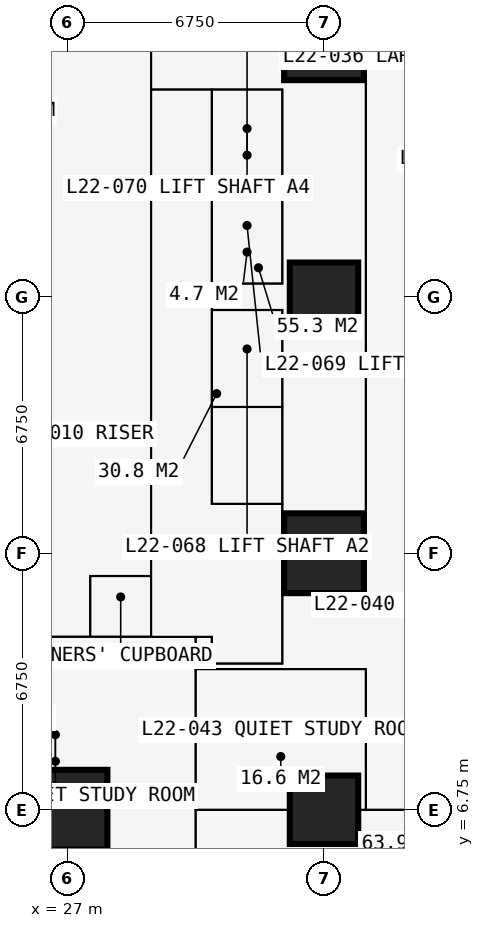
"""IFC4 building model, lengths in metres.
Left out: names, types, materials, properties, quantities, classifications, styles, units other than length and angle.
Written with IfcOpenShell. Run it as: python <this file> out.ifc"""

import sys

from ifc_helpers import new_model, si_unit, direction, frame, frame_2d, origin, origin_2d, place, context, subcontext, project, spatial, rectangle, extrude, element, fill, save


model = new_model("IFC4")
c1 = context("Model", 3, precision=1e-05, world=origin(), true_north=direction((0.0, 1.0)))
c2 = subcontext(c1, "Body", "Model", "MODEL_VIEW")
j1 = project(units=[si_unit("LENGTHUNIT", "METRE"), si_unit("PLANEANGLEUNIT", "RADIAN")], contexts=[c1])
p1 = place(None, origin())
s1 = spatial("IfcSite", under=j1, at=p1, CompositionType="ELEMENT")
p2 = place(p1, origin())
s2 = spatial("IfcBuilding", under=s1, at=p2, CompositionType="ELEMENT")
p3 = place(p2, frame((0.0, 0.0, 83.7)))
s3 = spatial("IfcBuildingStorey", under=s2, at=p3, CompositionType="ELEMENT", Elevation=83.7)
p4 = place(p3, frame((27.0, 6.75, 0.0), z_axis=(0.0, 0.0, 1.0), x_axis=(1.0, 0.0, 0.0)))
e1 = element("IfcColumn", 1, at=p4, inside=s3, PredefinedType="COLUMN", context=c2, shape_type="SweptSolid", body=[
    extrude(rectangle(XDim=2.1, YDim=2.1, at=origin_2d()), origin(), (0.0, 0.0, 1.0), 3.6),
])
p5 = place(p3, frame((33.75, 6.75, 0.0), z_axis=(0.0, 0.0, 1.0), x_axis=(1.0, 0.0, 0.0)))
e2 = element("IfcColumn", 2, at=p5, inside=s3, PredefinedType="COLUMN", context=c2, shape_type="SweptSolid", body=[
    extrude(rectangle(XDim=1.8, YDim=1.8, at=origin_2d()), origin(), (0.0, 0.0, 1.0), 3.6),
])
p6 = place(p3, frame((33.75, 13.5, 0.0), z_axis=(0.0, 0.0, 1.0), x_axis=(1.0, 0.0, 0.0)))
e3 = element("IfcColumn", 3, at=p6, inside=s3, PredefinedType="COLUMN", context=c2, shape_type="SweptSolid", body=[
    extrude(rectangle(XDim=2.1, YDim=2.1, at=origin_2d()), origin(), (0.0, 0.0, 1.0), 3.6),
])
p7 = place(p3, frame((33.75, 20.25, 0.0), z_axis=(0.0, 0.0, 1.0), x_axis=(1.0, 0.0, 0.0)))
e4 = element("IfcColumn", 4, at=p7, inside=s3, PredefinedType="COLUMN", context=c2, shape_type="SweptSolid", body=[
    extrude(rectangle(XDim=1.8, YDim=1.8, at=origin_2d()), origin(), (0.0, 0.0, 1.0), 3.6),
])
p8 = place(p3, frame((33.75, 27.0, 0.0), z_axis=(0.0, 0.0, 1.0), x_axis=(1.0, 0.0, 0.0)))
e5 = element("IfcColumn", 5, at=p8, inside=s3, PredefinedType="COLUMN", context=c2, shape_type="SweptSolid", body=[
    extrude(rectangle(XDim=2.1, YDim=2.1, at=origin_2d()), origin(), (0.0, 0.0, 1.0), 3.6),
])
p9 = place(p3, frame((12.9, 13.5, 0.0), z_axis=(0.0, 0.0, 1.0), x_axis=(1.0, 0.0, 0.0)))
e6 = element("IfcWall", 6, at=p9, inside=s3, PredefinedType="SHEAR", context=c2, shape_type="SweptSolid", body=[
    extrude(rectangle(XDim=14.7, YDim=1.2, at=frame_2d((7.35, 0.0))), origin(), (0.0, 0.0, 1.0), 3.6),
])
p10 = place(p3, frame((27.0, 14.1, 0.0), z_axis=(0.0, 0.0, 1.0), x_axis=(0.0, 1.0, 0.0)))
e7 = element("IfcWall", 7, at=p10, inside=s3, PredefinedType="SHEAR", context=c2, shape_type="SweptSolid", body=[
    extrude(rectangle(XDim=12.3, YDim=1.2, at=frame_2d((6.15, 0.0))), origin(), (0.0, 0.0, 1.0), 3.6),
])
p11 = place(p10, frame((3.65, 0.0, 0.0)))
e8 = element("IfcOpeningElement", 8, at=p11, cuts=e7, PredefinedType="OPENING", context=c2, shape_type="SweptSolid", body=[
    extrude(rectangle(XDim=1.2, YDim=2.2, at=frame_2d((0.6, 1.1))), frame((0.0, 0.61, 0.0), z_axis=(0.0, -1.0, 0.0), x_axis=(1.0, 0.0, 0.0)), (0.0, 0.0, 1.0), 1.22),
])
p12 = place(p3, frame((27.6, 27.0, 0.0), z_axis=(0.0, 0.0, 1.0), x_axis=(-1.0, 0.0, 0.0)))
e9 = element("IfcWall", 9, at=p12, inside=s3, PredefinedType="SHEAR", context=c2, shape_type="SweptSolid", body=[
    extrude(rectangle(XDim=14.7, YDim=1.2, at=frame_2d((7.35, 0.0))), origin(), (0.0, 0.0, 1.0), 3.6),
])
p13 = place(p12, frame((4.55, 0.0, 0.0)))
e10 = element("IfcOpeningElement", 10, at=p13, cuts=e9, PredefinedType="OPENING", context=c2, shape_type="SweptSolid", body=[
    extrude(rectangle(XDim=0.9, YDim=2.2, at=frame_2d((0.45, 1.1))), frame((0.0, 0.61, 0.0), z_axis=(0.0, -1.0, 0.0), x_axis=(1.0, 0.0, 0.0)), (0.0, 0.0, 1.0), 1.22),
])
p14 = place(p12, frame((7.525, 0.0, 0.0)))
e11 = element("IfcOpeningElement", 11, at=p14, cuts=e9, PredefinedType="OPENING", context=c2, shape_type="SweptSolid", body=[
    extrude(rectangle(XDim=1.0, YDim=2.2, at=frame_2d((0.5, 1.1))), frame((0.0, 0.61, 0.0), z_axis=(0.0, -1.0, 0.0), x_axis=(1.0, 0.0, 0.0)), (0.0, 0.0, 1.0), 1.22),
])
p15 = place(p3, frame((10.125, 11.3, 0.0), z_axis=(0.0, 0.0, 1.0), x_axis=(1.0, 0.0, 0.0)))
e12 = element("IfcWall", 12, at=p15, inside=s3, PredefinedType="PARTITIONING", context=c2, shape_type="SweptSolid", body=[
    extrude(rectangle(XDim=20.675, YDim=0.15, at=frame_2d((10.337, 0.0))), origin(), (0.0, 0.0, 1.0), 3.375),
])
p16 = place(p15, frame((8.375, 0.0, 0.0)))
e13 = element("IfcOpeningElement", 13, at=p16, cuts=e12, PredefinedType="OPENING", context=c2, shape_type="SweptSolid", body=[
    extrude(rectangle(XDim=1.0, YDim=2.2, at=frame_2d((0.5, 1.1))), frame((0.0, 0.085, 0.0), z_axis=(0.0, -1.0, 0.0), x_axis=(1.0, 0.0, 0.0)), (0.0, 0.0, 1.0), 0.17),
])
p17 = place(p15, frame((10.975, 0.0, 0.0)))
e14 = element("IfcOpeningElement", 14, at=p17, cuts=e12, PredefinedType="OPENING", context=c2, shape_type="SweptSolid", body=[
    extrude(rectangle(XDim=1.0, YDim=2.2, at=frame_2d((0.5, 1.1))), frame((0.0, 0.085, 0.0), z_axis=(0.0, -1.0, 0.0), x_axis=(1.0, 0.0, 0.0)), (0.0, 0.0, 1.0), 0.17),
])
p18 = place(p15, frame((3.925, 0.0, 0.0)))
e15 = element("IfcOpeningElement", 15, at=p18, cuts=e12, PredefinedType="OPENING", context=c2, shape_type="SweptSolid", body=[
    extrude(rectangle(XDim=0.95, YDim=2.2, at=frame_2d((0.475, 1.1))), frame((0.0, 0.085, 0.0), z_axis=(0.0, -1.0, 0.0), x_axis=(1.0, 0.0, 0.0)), (0.0, 0.0, 1.0), 0.17),
])
p19 = place(p3, frame((27.6, 11.3, 0.0), z_axis=(0.0, 0.0, 1.0), x_axis=(0.0, 1.0, 0.0)))
e16 = element("IfcWall", 16, at=p19, inside=s3, PredefinedType="PARTITIONING", context=c2, shape_type="SweptSolid", body=[
    extrude(rectangle(XDim=1.6, YDim=0.15, at=frame_2d((0.8, 0.0))), origin(), (0.0, 0.0, 1.0), 3.375),
])
p20 = place(p19, frame((0.3, 0.0, 0.0)))
e17 = element("IfcOpeningElement", 17, at=p20, cuts=e16, PredefinedType="OPENING", context=c2, shape_type="SweptSolid", body=[
    extrude(rectangle(XDim=0.95, YDim=2.2, at=frame_2d((0.475, 1.1))), frame((0.0, 0.085, 0.0), z_axis=(0.0, -1.0, 0.0), x_axis=(1.0, 0.0, 0.0)), (0.0, 0.0, 1.0), 0.17),
])
p21 = place(p3, frame((27.6, 12.9, 0.0), z_axis=(0.0, 0.0, 1.0), x_axis=(1.0, 0.0, 0.0)))
e18 = element("IfcWall", 18, at=p21, inside=s3, PredefinedType="PARTITIONING", context=c2, shape_type="SweptSolid", body=[
    extrude(rectangle(XDim=1.6, YDim=0.15, at=frame_2d((0.8, 0.0))), origin(), (0.0, 0.0, 1.0), 2.806),
])
p22 = place(p3, frame((29.2, 11.3, 0.0), z_axis=(0.0, 0.0, 1.0), x_axis=(0.0, 1.0, 0.0)))
e19 = element("IfcWall", 19, at=p22, inside=s3, PredefinedType="PARTITIONING", context=c2, shape_type="SweptSolid", body=[
    extrude(rectangle(XDim=17.9, YDim=0.2, at=frame_2d((8.95, 0.0))), origin(), (0.0, 0.0, 1.0), 3.375),
])
p23 = place(p22, frame((8.35, 0.0, 0.0)))
e20 = element("IfcOpeningElement", 20, at=p23, cuts=e19, PredefinedType="OPENING", context=c2, shape_type="SweptSolid", body=[
    extrude(rectangle(XDim=1.2, YDim=2.2, at=frame_2d((0.6, 1.1))), frame((0.0, 0.11, 0.0), z_axis=(0.0, -1.0, 0.0), x_axis=(1.0, 0.0, 0.0)), (0.0, 0.0, 1.0), 0.22),
])
p24 = place(p3, frame((29.2, 25.7, 0.0), z_axis=(0.0, 0.0, 1.0), x_axis=(1.0, 0.0, 0.0)))
e21 = element("IfcWall", 21, at=p24, inside=s3, PredefinedType="SHEAR", context=c2, shape_type="SweptSolid", body=[
    extrude(rectangle(XDim=3.45, YDim=0.1, at=frame_2d((1.725, 0.0))), origin(), (0.0, 0.0, 1.0), 3.375),
])
p25 = place(p3, frame((30.375, -0.734, 0.0), z_axis=(0.0, 0.0, 1.0), x_axis=(0.0, 1.0, 0.0)))
e22 = element("IfcWall", 22, at=p25, inside=s3, PredefinedType="PARTITIONING", context=c2, shape_type="SweptSolid", body=[
    extrude(rectangle(XDim=12.034, YDim=0.15, at=frame_2d((6.017, 0.0))), origin(), (0.0, 0.0, 1.0), 3.375),
])
p26 = place(p25, frame((5.134, 0.0, 0.0)))
e23 = element("IfcOpeningElement", 23, at=p26, cuts=e22, PredefinedType="OPENING", context=c2, shape_type="SweptSolid", body=[
    extrude(rectangle(XDim=1.0, YDim=2.2, at=frame_2d((0.5, 1.1))), frame((0.0, 0.085, 0.0), z_axis=(0.0, -1.0, 0.0), x_axis=(1.0, 0.0, 0.0)), (0.0, 0.0, 1.0), 0.17),
])
p27 = place(p3, frame((30.375, 6.75, 0.0), z_axis=(0.0, 0.0, 1.0), x_axis=(1.0, 0.0, 0.0)))
e24 = element("IfcWall", 24, at=p27, inside=s3, PredefinedType="PARTITIONING", context=c2, shape_type="SweptSolid", body=[
    extrude(rectangle(XDim=5.975, YDim=0.15, at=frame_2d((2.988, 0.0))), origin(), (0.0, 0.0, 1.0), 2.877),
])
p28 = place(p3, frame((30.375, 10.45, 0.0), z_axis=(0.0, 0.0, 1.0), x_axis=(1.0, 0.0, 0.0)))
e25 = element("IfcWall", 25, at=p28, inside=s3, PredefinedType="PARTITIONING", context=c2, shape_type="SweptSolid", body=[
    extrude(rectangle(XDim=4.475, YDim=0.15, at=frame_2d((2.238, 0.0))), origin(), (0.0, 0.0, 1.0), 3.375),
])
p29 = place(p28, frame((2.35, 0.0, 0.0)))
e26 = element("IfcOpeningElement", 26, at=p29, cuts=e25, PredefinedType="OPENING", context=c2, shape_type="SweptSolid", body=[
    extrude(rectangle(XDim=0.95, YDim=2.2, at=frame_2d((0.475, 1.1))), frame((0.0, 0.085, 0.0), z_axis=(0.0, -1.0, 0.0), x_axis=(1.0, 0.0, 0.0)), (0.0, 0.0, 1.0), 0.17),
])
p30 = place(p3, frame((30.8, 10.6, 0.0), z_axis=(0.0, 0.0, 1.0), x_axis=(0.0, 1.0, 0.0)))
e27 = element("IfcWall", 27, at=p30, inside=s3, PredefinedType="PARTITIONING", context=c2, shape_type="SweptSolid", body=[
    extrude(rectangle(XDim=0.7, YDim=0.15, at=frame_2d((0.35, 0.0))), origin(), (0.0, 0.0, 1.0), 3.375),
])
p31 = place(p3, frame((30.8, 10.6, 0.0), z_axis=(0.0, 0.0, 1.0), x_axis=(1.0, 0.0, 0.0)))
e28 = element("IfcWall", 28, at=p31, inside=s3, PredefinedType="PARTITIONING", context=c2, shape_type="SweptSolid", body=[
    extrude(rectangle(XDim=1.85, YDim=0.15, at=frame_2d((0.925, 0.0))), origin(), (0.0, 0.0, 1.0), 3.375),
])
p32 = place(p3, frame((30.8, 14.8, 0.0), z_axis=(0.0, 0.0, 1.0), x_axis=(0.0, 1.0, 0.0)))
e29 = element("IfcWall", 29, at=p32, inside=s3, PredefinedType="PARTITIONING", context=c2, shape_type="SweptSolid", body=[
    extrude(rectangle(XDim=10.9, YDim=0.15, at=frame_2d((5.45, 0.0))), origin(), (0.0, 0.0, 1.0), 3.375),
])
p33 = place(p32, frame((0.75, 0.0, 0.0)))
e30 = element("IfcOpeningElement", 30, at=p33, cuts=e29, PredefinedType="OPENING", context=c2, shape_type="SweptSolid", body=[
    extrude(rectangle(XDim=1.1, YDim=2.2, at=frame_2d((0.55, 1.1))), frame((0.0, 0.085, 0.0), z_axis=(0.0, -1.0, 0.0), x_axis=(1.0, 0.0, 0.0)), (0.0, 0.0, 1.0), 0.17),
])
p34 = place(p32, frame((3.25, 0.0, 0.0)))
e31 = element("IfcOpeningElement", 31, at=p34, cuts=e29, PredefinedType="OPENING", context=c2, shape_type="SweptSolid", body=[
    extrude(rectangle(XDim=1.1, YDim=2.2, at=frame_2d((0.55, 1.1))), frame((0.0, 0.085, 0.0), z_axis=(0.0, -1.0, 0.0), x_axis=(1.0, 0.0, 0.0)), (0.0, 0.0, 1.0), 0.17),
])
p35 = place(p32, frame((6.5, 0.0, 0.0)))
e32 = element("IfcOpeningElement", 32, at=p35, cuts=e29, PredefinedType="OPENING", context=c2, shape_type="SweptSolid", body=[
    extrude(rectangle(XDim=1.1, YDim=2.2, at=frame_2d((0.55, 1.1))), frame((0.0, 0.085, 0.0), z_axis=(0.0, -1.0, 0.0), x_axis=(1.0, 0.0, 0.0)), (0.0, 0.0, 1.0), 0.17),
])
p36 = place(p32, frame((9.05, 0.0, 0.0)))
e33 = element("IfcOpeningElement", 33, at=p36, cuts=e29, PredefinedType="OPENING", context=c2, shape_type="SweptSolid", body=[
    extrude(rectangle(XDim=1.1, YDim=2.2, at=frame_2d((0.55, 1.1))), frame((0.0, 0.085, 0.0), z_axis=(0.0, -1.0, 0.0), x_axis=(1.0, 0.0, 0.0)), (0.0, 0.0, 1.0), 0.17),
])
for number, where, z_axis, x_axis in (
    (34, (30.8, 14.8, 0.0), (0.0, 0.0, 1.0), (1.0, 0.0, 0.0)),
    (35, (30.8, 17.35, 0.0), (0.0, 0.0, 1.0), (1.0, 0.0, 0.0)),
    (36, (30.8, 19.9, 0.0), (0.0, 0.0, 1.0), (1.0, 0.0, 0.0)),
    (37, (30.8, 20.6, 0.0), (0.0, 0.0, 1.0), (1.0, 0.0, 0.0)),
    (38, (30.8, 23.15, 0.0), (0.0, 0.0, 1.0), (1.0, 0.0, 0.0)),
):
    element("IfcWall", number, at=place(p3, frame(where, z_axis=z_axis, x_axis=x_axis)), inside=s3, PredefinedType="SHEAR", context=c2, shape_type="SweptSolid", body=[
        extrude(rectangle(XDim=1.85, YDim=0.1, at=frame_2d((0.925, 0.0))), origin(), (0.0, 0.0, 1.0), 3.375),
    ])
p37 = place(p3, frame((32.65, 10.6, 0.0), z_axis=(0.0, 0.0, 1.0), x_axis=(0.0, 1.0, 0.0)))
e39 = element("IfcWall", 39, at=p37, inside=s3, PredefinedType="SHEAR", context=c2, shape_type="SweptSolid", body=[
    extrude(rectangle(XDim=9.3, YDim=0.1, at=frame_2d((4.65, 0.0))), origin(), (0.0, 0.0, 1.0), 3.375),
])
p38 = place(p37, frame((0.5, 0.0, 0.0)))
e40 = element("IfcOpeningElement", 40, at=p38, cuts=e39, PredefinedType="OPENING", context=c2, shape_type="SweptSolid", body=[
    extrude(rectangle(XDim=1.0, YDim=2.2, at=frame_2d((0.5, 1.1))), frame((0.0, 0.06, 0.0), z_axis=(0.0, -1.0, 0.0), x_axis=(1.0, 0.0, 0.0)), (0.0, 0.0, 1.0), 0.12),
])
p39 = place(p3, frame((32.65, 12.55, 0.0), z_axis=(0.0, 0.0, 1.0), x_axis=(1.0, 0.0, 0.0)))
e41 = element("IfcWall", 41, at=p39, inside=s3, PredefinedType="PARTITIONING", context=c2, shape_type="SweptSolid", body=[
    extrude(rectangle(XDim=2.2, YDim=0.15, at=frame_2d((1.1, 0.0))), origin(), (0.0, 0.0, 1.0), 3.375),
])
p40 = place(p3, frame((32.65, 20.6, 0.0), z_axis=(0.0, 0.0, 1.0), x_axis=(0.0, 1.0, 0.0)))
e42 = element("IfcWall", 42, at=p40, inside=s3, PredefinedType="PARTITIONING", context=c2, shape_type="SweptSolid", body=[
    extrude(rectangle(XDim=5.1, YDim=0.15, at=frame_2d((2.55, 0.0))), origin(), (0.0, 0.0, 1.0), 3.375),
])
p41 = place(p3, frame((34.85, 6.75, 0.0), z_axis=(0.0, 0.0, 1.0), x_axis=(0.0, 1.0, 0.0)))
e43 = element("IfcWall", 43, at=p41, inside=s3, PredefinedType="PARTITIONING", context=c2, shape_type="SweptSolid", body=[
    extrude(rectangle(XDim=3.7, YDim=0.15, at=frame_2d((1.85, 0.0))), origin(), (0.0, 0.0, 1.0), 3.375),
])
p42 = place(p3, frame((34.85, 12.55, 0.0), z_axis=(0.0, 0.0, 1.0), x_axis=(0.0, 1.0, 0.0)))
e44 = element("IfcWall", 44, at=p42, inside=s3, PredefinedType="PARTITIONING", context=c2, shape_type="SweptSolid", body=[
    extrude(rectangle(XDim=17.825, YDim=0.15, at=frame_2d((8.913, 0.0))), origin(), (0.0, 0.0, 1.0), 3.375),
])
p43 = place(p42, frame((8.6, 0.0, 0.0)))
e45 = element("IfcOpeningElement", 45, at=p43, cuts=e44, PredefinedType="OPENING", context=c2, shape_type="SweptSolid", body=[
    extrude(rectangle(XDim=0.95, YDim=2.2, at=frame_2d((0.475, 1.1))), frame((0.0, 0.085, 0.0), z_axis=(0.0, -1.0, 0.0), x_axis=(1.0, 0.0, 0.0)), (0.0, 0.0, 1.0), 0.17),
])
p44 = place(p11, origin())
e46 = element("IfcDoor", 46, at=p44, inside=s3, OperationType="DOUBLE_DOOR_SINGLE_SWING", PredefinedType="DOOR", context=c2, shape_type="SweptSolid", body=[
    extrude(rectangle(XDim=1.2, YDim=2.2, at=frame_2d((0.6, 1.1))), frame((0.0, 0.025, 0.0), z_axis=(0.0, -1.0, 0.0), x_axis=(1.0, 0.0, 0.0)), (0.0, 0.0, 1.0), 0.05),
])
fill(e8, e46)
p45 = place(p20, origin())
e47 = element("IfcDoor", 47, at=p45, inside=s3, OperationType="SINGLE_SWING_LEFT", PredefinedType="DOOR", context=c2, shape_type="SweptSolid", body=[
    extrude(rectangle(XDim=0.95, YDim=2.2, at=frame_2d((0.475, 1.1))), frame((0.0, 0.025, 0.0), z_axis=(0.0, -1.0, 0.0), x_axis=(1.0, 0.0, 0.0)), (0.0, 0.0, 1.0), 0.05),
])
fill(e17, e47)
p46 = place(p38, origin())
e48 = element("IfcDoor", 48, at=p46, inside=s3, OperationType="SINGLE_SWING_LEFT", PredefinedType="DOOR", context=c2, shape_type="SweptSolid", body=[
    extrude(rectangle(XDim=1.0, YDim=2.2, at=frame_2d((0.5, 1.1))), frame((0.0, 0.025, 0.0), z_axis=(0.0, -1.0, 0.0), x_axis=(1.0, 0.0, 0.0)), (0.0, 0.0, 1.0), 0.05),
])
fill(e40, e48)
p47 = place(p43, origin())
e49 = element("IfcDoor", 49, at=p47, inside=s3, OperationType="SINGLE_SWING_LEFT", PredefinedType="DOOR", context=c2, shape_type="SweptSolid", body=[
    extrude(rectangle(XDim=0.95, YDim=2.2, at=frame_2d((0.475, 1.1))), frame((0.0, 0.025, 0.0), z_axis=(0.0, -1.0, 0.0), x_axis=(1.0, 0.0, 0.0)), (0.0, 0.0, 1.0), 0.05),
])
fill(e45, e49)
p48 = place(p29, origin())
e50 = element("IfcDoor", 50, at=p48, inside=s3, OperationType="SINGLE_SWING_LEFT", PredefinedType="DOOR", context=c2, shape_type="SweptSolid", body=[
    extrude(rectangle(XDim=0.95, YDim=2.2, at=frame_2d((0.475, 1.1))), frame((0.0, 0.025, 0.0), z_axis=(0.0, -1.0, 0.0), x_axis=(1.0, 0.0, 0.0)), (0.0, 0.0, 1.0), 0.05),
])
fill(e26, e50)
p49 = place(p33, origin())
e51 = element("IfcDoor", 51, at=p49, inside=s3, OperationType="DOUBLE_DOOR_SLIDING", PredefinedType="DOOR", context=c2, shape_type="SweptSolid", body=[
    extrude(rectangle(XDim=1.1, YDim=2.2, at=frame_2d((0.55, 1.1))), frame((0.0, 0.025, 0.0), z_axis=(0.0, -1.0, 0.0), x_axis=(1.0, 0.0, 0.0)), (0.0, 0.0, 1.0), 0.05),
])
fill(e30, e51)
p50 = place(p34, origin())
e52 = element("IfcDoor", 52, at=p50, inside=s3, OperationType="DOUBLE_DOOR_SLIDING", PredefinedType="DOOR", context=c2, shape_type="SweptSolid", body=[
    extrude(rectangle(XDim=1.1, YDim=2.2, at=frame_2d((0.55, 1.1))), frame((0.0, 0.025, 0.0), z_axis=(0.0, -1.0, 0.0), x_axis=(1.0, 0.0, 0.0)), (0.0, 0.0, 1.0), 0.05),
])
fill(e31, e52)
p51 = place(p35, origin())
e53 = element("IfcDoor", 53, at=p51, inside=s3, OperationType="DOUBLE_DOOR_SLIDING", PredefinedType="DOOR", context=c2, shape_type="SweptSolid", body=[
    extrude(rectangle(XDim=1.1, YDim=2.2, at=frame_2d((0.55, 1.1))), frame((0.0, 0.025, 0.0), z_axis=(0.0, -1.0, 0.0), x_axis=(1.0, 0.0, 0.0)), (0.0, 0.0, 1.0), 0.05),
])
fill(e32, e53)
p52 = place(p36, origin())
e54 = element("IfcDoor", 54, at=p52, inside=s3, OperationType="DOUBLE_DOOR_SLIDING", PredefinedType="DOOR", context=c2, shape_type="SweptSolid", body=[
    extrude(rectangle(XDim=1.1, YDim=2.2, at=frame_2d((0.55, 1.1))), frame((0.0, 0.025, 0.0), z_axis=(0.0, -1.0, 0.0), x_axis=(1.0, 0.0, 0.0)), (0.0, 0.0, 1.0), 0.05),
])
fill(e33, e54)
p53 = place(p23, origin())
e55 = element("IfcDoor", 55, at=p53, inside=s3, OperationType="DOUBLE_DOOR_SINGLE_SWING", PredefinedType="DOOR", context=c2, shape_type="SweptSolid", body=[
    extrude(rectangle(XDim=1.2, YDim=2.2, at=frame_2d((0.6, 1.1))), frame((0.0, 0.025, 0.0), z_axis=(0.0, -1.0, 0.0), x_axis=(1.0, 0.0, 0.0)), (0.0, 0.0, 1.0), 0.05),
])
fill(e20, e55)
save(model, sys.argv[1])
